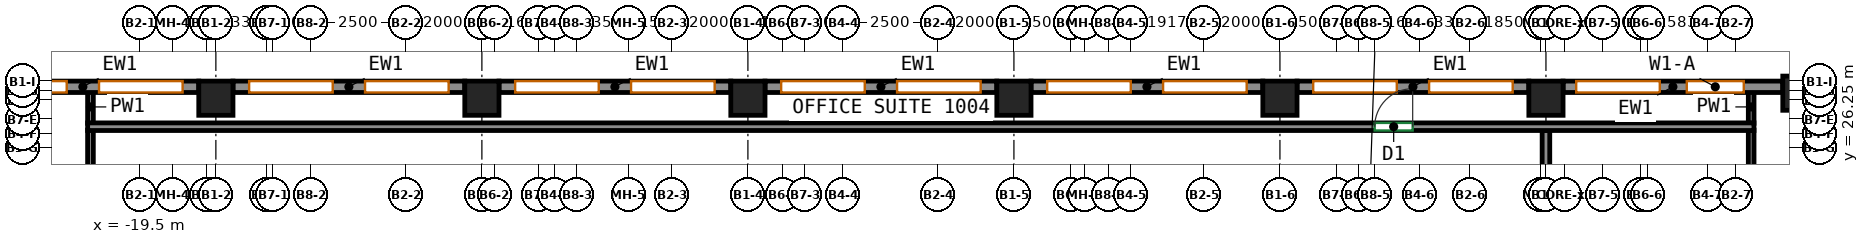
"""IFC4 building model, lengths in metres.
Left out: names, types, materials, properties, quantities, classifications, styles, units other than length and angle.
Written with IfcOpenShell. Run it as: python <this file> out.ifc"""

import sys

from ifc_helpers import new_model, si_unit, direction, frame, frame_2d, origin, origin_2d, place, context, subcontext, project, spatial, rectangle, extrude, source, transform, mapped, element, fill, save


model = new_model("IFC4")
c1 = context("Model", 3, precision=1e-05, world=origin(), true_north=direction((0.0, 1.0)))
c2 = subcontext(c1, "Body", "Model", "MODEL_VIEW")
j1 = project(units=[si_unit("LENGTHUNIT", "METRE"), si_unit("PLANEANGLEUNIT", "RADIAN")], contexts=[c1])
p1 = place(None, origin())
s1 = spatial("IfcSite", under=j1, at=p1, CompositionType="ELEMENT")
p2 = place(p1, origin())
s2 = spatial("IfcBuilding", under=s1, at=p2, CompositionType="ELEMENT")
p3 = place(p2, frame((0.0, 0.0, 47.0)))
s3 = spatial("IfcBuildingStorey", under=s2, at=p3, CompositionType="ELEMENT", Elevation=47.0)
m1 = source(origin(), c2, "Body", "SweptSolid", [
    extrude(rectangle(XDim=0.9, YDim=0.9, at=origin_2d()), origin(), (0.0, 0.0, 1.0), 3.72),
])
for number, where, z_axis, x_axis in (
    (1, (-17.5, 27.55, 0.0), (0.0, 0.0, 1.0), (1.0, 0.0, 0.0)),
    (2, (-10.5, 27.55, 0.0), (0.0, 0.0, 1.0), (1.0, 0.0, 0.0)),
    (3, (-3.5, 27.55, 0.0), (0.0, 0.0, 1.0), (1.0, 0.0, 0.0)),
    (4, (3.5, 27.55, 0.0), (0.0, 0.0, 1.0), (1.0, 0.0, 0.0)),
    (5, (10.5, 27.55, 0.0), (0.0, 0.0, 1.0), (1.0, 0.0, 0.0)),
    (6, (17.5, 27.55, 0.0), (0.0, 0.0, 1.0), (1.0, 0.0, 0.0)),
    (7, (24.182, 27.682, 0.0), (0.0, 0.0, 1.0), (1.0, 0.0, 0.0)),
):
    element("IfcColumn", number, at=place(p3, frame(where, z_axis=z_axis, x_axis=x_axis)), inside=s3, PredefinedType="COLUMN", context=c2, shape_type="MappedRepresentation", body=[
        mapped(m1, transform((0.0, 0.0, 0.0))),
    ])
m2 = source(origin(), c2, "Body", "SweptSolid", [
    extrude(rectangle(XDim=5.782, YDim=0.3, at=frame_2d((2.891, 0.0))), origin(), (0.0, 0.0, 1.0), 3.72),
])
p4 = place(p3, frame((23.732, 27.85, 0.0), z_axis=(0.0, 0.0, 1.0), x_axis=(-1.0, 0.0, 0.0)))
e8 = element("IfcWall", 8, at=p4, inside=s3, PredefinedType="SOLIDWALL", context=c2, shape_type="MappedRepresentation", body=[
    mapped(m2, transform((0.0, 0.0, 0.0))),
])
p5 = place(p4, frame((1.026, 0.0, 0.7)))
e9 = element("IfcOpeningElement", 9, at=p5, cuts=e8, PredefinedType="OPENING", context=c2, shape_type="SweptSolid", body=[
    extrude(rectangle(XDim=1.5, YDim=2.25, at=frame_2d((0.75, 1.125))), frame((0.0, 0.16, 0.0), z_axis=(0.0, -1.0, 0.0), x_axis=(1.0, 0.0, 0.0)), (0.0, 0.0, 1.0), 0.32),
])
p6 = place(p4, frame((3.236, 0.0, 0.7)))
e10 = element("IfcOpeningElement", 10, at=p6, cuts=e8, PredefinedType="OPENING", context=c2, shape_type="SweptSolid", body=[
    extrude(rectangle(XDim=2.2, YDim=2.25, at=frame_2d((1.1, 1.125))), frame((0.0, 0.16, 0.0), z_axis=(0.0, -1.0, 0.0), x_axis=(1.0, 0.0, 0.0)), (0.0, 0.0, 1.0), 0.32),
])
m3 = source(origin(), c2, "Body", "SweptSolid", [
    extrude(rectangle(XDim=6.1, YDim=0.3, at=frame_2d((3.05, 0.0))), origin(), (0.0, 0.0, 1.0), 3.72),
])
p7 = place(p3, frame((17.05, 27.85, 0.0), z_axis=(0.0, 0.0, 1.0), x_axis=(-1.0, 0.0, 0.0)))
e11 = element("IfcWall", 11, at=p7, inside=s3, PredefinedType="SOLIDWALL", context=c2, shape_type="MappedRepresentation", body=[
    mapped(m3, transform((0.0, 0.0, 0.0))),
])
p8 = place(p7, frame((0.425, 0.0, 0.7)))
e12 = element("IfcOpeningElement", 12, at=p8, cuts=e11, PredefinedType="OPENING", context=c2, shape_type="SweptSolid", body=[
    extrude(rectangle(XDim=2.2, YDim=2.25, at=frame_2d((1.1, 1.125))), frame((0.0, 0.16, 0.0), z_axis=(0.0, -1.0, 0.0), x_axis=(1.0, 0.0, 0.0)), (0.0, 0.0, 1.0), 0.32),
])
p9 = place(p7, frame((3.475, 0.0, 0.7)))
e13 = element("IfcOpeningElement", 13, at=p9, cuts=e11, PredefinedType="OPENING", context=c2, shape_type="SweptSolid", body=[
    extrude(rectangle(XDim=2.2, YDim=2.25, at=frame_2d((1.1, 1.125))), frame((0.0, 0.16, 0.0), z_axis=(0.0, -1.0, 0.0), x_axis=(1.0, 0.0, 0.0)), (0.0, 0.0, 1.0), 0.32),
])
p10 = place(p3, frame((10.05, 27.85, 0.0), z_axis=(0.0, 0.0, 1.0), x_axis=(-1.0, 0.0, 0.0)))
e14 = element("IfcWall", 14, at=p10, inside=s3, PredefinedType="SOLIDWALL", context=c2, shape_type="MappedRepresentation", body=[
    mapped(m3, transform((0.0, 0.0, 0.0))),
])
p11 = place(p10, frame((0.425, 0.0, 0.7)))
e15 = element("IfcOpeningElement", 15, at=p11, cuts=e14, PredefinedType="OPENING", context=c2, shape_type="SweptSolid", body=[
    extrude(rectangle(XDim=2.2, YDim=2.25, at=frame_2d((1.1, 1.125))), frame((0.0, 0.16, 0.0), z_axis=(0.0, -1.0, 0.0), x_axis=(1.0, 0.0, 0.0)), (0.0, 0.0, 1.0), 0.32),
])
p12 = place(p10, frame((3.475, 0.0, 0.7)))
e16 = element("IfcOpeningElement", 16, at=p12, cuts=e14, PredefinedType="OPENING", context=c2, shape_type="SweptSolid", body=[
    extrude(rectangle(XDim=2.2, YDim=2.25, at=frame_2d((1.1, 1.125))), frame((0.0, 0.16, 0.0), z_axis=(0.0, -1.0, 0.0), x_axis=(1.0, 0.0, 0.0)), (0.0, 0.0, 1.0), 0.32),
])
p13 = place(p3, frame((3.05, 27.85, 0.0), z_axis=(0.0, 0.0, 1.0), x_axis=(-1.0, 0.0, 0.0)))
e17 = element("IfcWall", 17, at=p13, inside=s3, PredefinedType="SOLIDWALL", context=c2, shape_type="MappedRepresentation", body=[
    mapped(m3, transform((0.0, 0.0, 0.0))),
])
p14 = place(p13, frame((0.425, 0.0, 0.7)))
e18 = element("IfcOpeningElement", 18, at=p14, cuts=e17, PredefinedType="OPENING", context=c2, shape_type="SweptSolid", body=[
    extrude(rectangle(XDim=2.2, YDim=2.25, at=frame_2d((1.1, 1.125))), frame((0.0, 0.16, 0.0), z_axis=(0.0, -1.0, 0.0), x_axis=(1.0, 0.0, 0.0)), (0.0, 0.0, 1.0), 0.32),
])
p15 = place(p13, frame((3.475, 0.0, 0.7)))
e19 = element("IfcOpeningElement", 19, at=p15, cuts=e17, PredefinedType="OPENING", context=c2, shape_type="SweptSolid", body=[
    extrude(rectangle(XDim=2.2, YDim=2.25, at=frame_2d((1.1, 1.125))), frame((0.0, 0.16, 0.0), z_axis=(0.0, -1.0, 0.0), x_axis=(1.0, 0.0, 0.0)), (0.0, 0.0, 1.0), 0.32),
])
p16 = place(p3, frame((-3.95, 27.85, 0.0), z_axis=(0.0, 0.0, 1.0), x_axis=(-1.0, 0.0, 0.0)))
e20 = element("IfcWall", 20, at=p16, inside=s3, PredefinedType="SOLIDWALL", context=c2, shape_type="MappedRepresentation", body=[
    mapped(m3, transform((0.0, 0.0, 0.0))),
])
p17 = place(p16, frame((0.425, 0.0, 0.7)))
e21 = element("IfcOpeningElement", 21, at=p17, cuts=e20, PredefinedType="OPENING", context=c2, shape_type="SweptSolid", body=[
    extrude(rectangle(XDim=2.2, YDim=2.25, at=frame_2d((1.1, 1.125))), frame((0.0, 0.16, 0.0), z_axis=(0.0, -1.0, 0.0), x_axis=(1.0, 0.0, 0.0)), (0.0, 0.0, 1.0), 0.32),
])
p18 = place(p16, frame((3.475, 0.0, 0.7)))
e22 = element("IfcOpeningElement", 22, at=p18, cuts=e20, PredefinedType="OPENING", context=c2, shape_type="SweptSolid", body=[
    extrude(rectangle(XDim=2.2, YDim=2.25, at=frame_2d((1.1, 1.125))), frame((0.0, 0.16, 0.0), z_axis=(0.0, -1.0, 0.0), x_axis=(1.0, 0.0, 0.0)), (0.0, 0.0, 1.0), 0.32),
])
p19 = place(p3, frame((-10.95, 27.85, 0.0), z_axis=(0.0, 0.0, 1.0), x_axis=(-1.0, 0.0, 0.0)))
e23 = element("IfcWall", 23, at=p19, inside=s3, PredefinedType="SOLIDWALL", context=c2, shape_type="MappedRepresentation", body=[
    mapped(m3, transform((0.0, 0.0, 0.0))),
])
p20 = place(p19, frame((0.425, 0.0, 0.7)))
e24 = element("IfcOpeningElement", 24, at=p20, cuts=e23, PredefinedType="OPENING", context=c2, shape_type="SweptSolid", body=[
    extrude(rectangle(XDim=2.2, YDim=2.25, at=frame_2d((1.1, 1.125))), frame((0.0, 0.16, 0.0), z_axis=(0.0, -1.0, 0.0), x_axis=(1.0, 0.0, 0.0)), (0.0, 0.0, 1.0), 0.32),
])
p21 = place(p19, frame((3.475, 0.0, 0.7)))
e25 = element("IfcOpeningElement", 25, at=p21, cuts=e23, PredefinedType="OPENING", context=c2, shape_type="SweptSolid", body=[
    extrude(rectangle(XDim=2.2, YDim=2.25, at=frame_2d((1.1, 1.125))), frame((0.0, 0.16, 0.0), z_axis=(0.0, -1.0, 0.0), x_axis=(1.0, 0.0, 0.0)), (0.0, 0.0, 1.0), 0.32),
])
p22 = place(p3, frame((-17.95, 27.85, 0.0), z_axis=(0.0, 0.0, 1.0), x_axis=(-1.0, 0.0, 0.0)))
e26 = element("IfcWall", 26, at=p22, inside=s3, PredefinedType="SOLIDWALL", context=c2, shape_type="MappedRepresentation", body=[
    mapped(m3, transform((0.0, 0.0, 0.0))),
])
p23 = place(p22, frame((0.425, 0.0, 0.7)))
e27 = element("IfcOpeningElement", 27, at=p23, cuts=e26, PredefinedType="OPENING", context=c2, shape_type="SweptSolid", body=[
    extrude(rectangle(XDim=2.2, YDim=2.25, at=frame_2d((1.1, 1.125))), frame((0.0, 0.16, 0.0), z_axis=(0.0, -1.0, 0.0), x_axis=(1.0, 0.0, 0.0)), (0.0, 0.0, 1.0), 0.32),
])
p24 = place(p22, frame((3.475, 0.0, 0.7)))
e28 = element("IfcOpeningElement", 28, at=p24, cuts=e26, PredefinedType="OPENING", context=c2, shape_type="SweptSolid", body=[
    extrude(rectangle(XDim=2.2, YDim=2.25, at=frame_2d((1.1, 1.125))), frame((0.0, 0.16, 0.0), z_axis=(0.0, -1.0, 0.0), x_axis=(1.0, 0.0, 0.0)), (0.0, 0.0, 1.0), 0.32),
])
p25 = place(p3, frame((-20.8, 3.275, 0.0), z_axis=(0.0, 0.0, 1.0), x_axis=(0.0, 1.0, 0.0)))
e29 = element("IfcWall", 29, at=p25, inside=s3, PredefinedType="PARTITIONING", context=c2, shape_type="SweptSolid", body=[
    extrude(rectangle(XDim=23.435, YDim=0.15, at=frame_2d((11.718, 0.0))), origin(), (0.0, 0.0, 1.0), 3.72),
])
p26 = place(p25, frame((10.216, 0.0, 0.0)))
e30 = element("IfcOpeningElement", 30, at=p26, cuts=e29, PredefinedType="OPENING", context=c2, shape_type="SweptSolid", body=[
    extrude(rectangle(XDim=0.9, YDim=2.1, at=frame_2d((0.45, 1.05))), frame((0.0, 0.085, 0.0), z_axis=(0.0, -1.0, 0.0), x_axis=(1.0, 0.0, 0.0)), (0.0, 0.0, 1.0), 0.17),
])
p27 = place(p3, frame((22.9, 3.275, 0.0), z_axis=(0.0, 0.0, 1.0), x_axis=(0.0, 1.0, 0.0)))
e31 = element("IfcWall", 31, at=p27, inside=s3, PredefinedType="PARTITIONING", context=c2, shape_type="SweptSolid", body=[
    extrude(rectangle(XDim=23.435, YDim=0.15, at=frame_2d((11.718, 0.0))), origin(), (0.0, 0.0, 1.0), 3.72),
])
p28 = place(p27, frame((9.715, 0.0, 0.0)))
e32 = element("IfcOpeningElement", 32, at=p28, cuts=e31, PredefinedType="OPENING", context=c2, shape_type="SweptSolid", body=[
    extrude(rectangle(XDim=0.9, YDim=2.1, at=frame_2d((0.45, 1.05))), frame((0.0, 0.085, 0.0), z_axis=(0.0, -1.0, 0.0), x_axis=(1.0, 0.0, 0.0)), (0.0, 0.0, 1.0), 0.17),
])
for number, where, z_axis, x_axis in (
    (33, (-20.8, 26.891, 0.0), (0.0, 0.0, 1.0), (0.0, 1.0, 0.0)),
    (34, (22.9, 26.891, 0.0), (0.0, 0.0, 1.0), (0.0, 1.0, 0.0)),
):
    element("IfcWall", number, at=place(p3, frame(where, z_axis=z_axis, x_axis=x_axis)), inside=s3, PredefinedType="PARTITIONING", context=c2, shape_type="SweptSolid", body=[
        extrude(rectangle(XDim=0.859, YDim=0.15, at=frame_2d((0.429, 0.0))), origin(), (0.0, 0.0, 1.0), 3.72),
    ])
p29 = place(p3, frame((17.5, 22.0, 0.0), z_axis=(0.0, 0.0, 1.0), x_axis=(0.0, 1.0, 0.0)))
e35 = element("IfcWall", 35, at=p29, inside=s3, PredefinedType="PARTITIONING", context=c2, shape_type="SweptSolid", body=[
    extrude(rectangle(XDim=4.7, YDim=0.2, at=frame_2d((2.35, 0.0))), origin(), (0.0, 0.0, 1.0), 3.72),
])
p30 = place(p3, frame((-20.874, 26.8, 0.0), z_axis=(0.0, 0.0, 1.0), x_axis=(1.0, 0.0, 0.0)))
e36 = element("IfcWall", 36, at=p30, inside=s3, PredefinedType="PARTITIONING", context=c2, shape_type="SweptSolid", body=[
    extrude(rectangle(XDim=43.848, YDim=0.2, at=frame_2d((21.924, 0.0))), origin(), (0.0, 0.0, 1.0), 3.72),
])
p31 = place(p30, frame((33.867, 0.0, 0.0)))
e37 = element("IfcOpeningElement", 37, at=p31, cuts=e36, PredefinedType="OPENING", context=c2, shape_type="SweptSolid", body=[
    extrude(rectangle(XDim=1.0, YDim=2.1, at=frame_2d((0.5, 1.05))), frame((0.0, 0.11, 0.0), z_axis=(0.0, -1.0, 0.0), x_axis=(1.0, 0.0, 0.0)), (0.0, 0.0, 1.0), 0.22),
])
p32 = place(p5, origin())
e38 = element("IfcWindow", 38, at=p32, inside=s3, PartitioningType="SINGLE_PANEL", PredefinedType="WINDOW", context=c2, shape_type="SweptSolid", body=[
    extrude(rectangle(XDim=1.5, YDim=2.25, at=frame_2d((0.75, 1.125))), frame((0.0, 0.03, 0.0), z_axis=(0.0, -1.0, 0.0), x_axis=(1.0, 0.0, 0.0)), (0.0, 0.0, 1.0), 0.06),
])
fill(e9, e38)
p33 = place(p6, origin())
e39 = element("IfcWindow", 39, at=p33, inside=s3, PartitioningType="SINGLE_PANEL", PredefinedType="WINDOW", context=c2, shape_type="SweptSolid", body=[
    extrude(rectangle(XDim=2.2, YDim=2.25, at=frame_2d((1.1, 1.125))), frame((0.0, 0.03, 0.0), z_axis=(0.0, -1.0, 0.0), x_axis=(1.0, 0.0, 0.0)), (0.0, 0.0, 1.0), 0.06),
])
fill(e10, e39)
p34 = place(p8, origin())
e40 = element("IfcWindow", 40, at=p34, inside=s3, PartitioningType="SINGLE_PANEL", PredefinedType="WINDOW", context=c2, shape_type="SweptSolid", body=[
    extrude(rectangle(XDim=2.2, YDim=2.25, at=frame_2d((1.1, 1.125))), frame((0.0, 0.03, 0.0), z_axis=(0.0, -1.0, 0.0), x_axis=(1.0, 0.0, 0.0)), (0.0, 0.0, 1.0), 0.06),
])
fill(e12, e40)
p35 = place(p9, origin())
e41 = element("IfcWindow", 41, at=p35, inside=s3, PartitioningType="SINGLE_PANEL", PredefinedType="WINDOW", context=c2, shape_type="SweptSolid", body=[
    extrude(rectangle(XDim=2.2, YDim=2.25, at=frame_2d((1.1, 1.125))), frame((0.0, 0.03, 0.0), z_axis=(0.0, -1.0, 0.0), x_axis=(1.0, 0.0, 0.0)), (0.0, 0.0, 1.0), 0.06),
])
fill(e13, e41)
p36 = place(p11, origin())
e42 = element("IfcWindow", 42, at=p36, inside=s3, PartitioningType="SINGLE_PANEL", PredefinedType="WINDOW", context=c2, shape_type="SweptSolid", body=[
    extrude(rectangle(XDim=2.2, YDim=2.25, at=frame_2d((1.1, 1.125))), frame((0.0, 0.03, 0.0), z_axis=(0.0, -1.0, 0.0), x_axis=(1.0, 0.0, 0.0)), (0.0, 0.0, 1.0), 0.06),
])
fill(e15, e42)
p37 = place(p12, origin())
e43 = element("IfcWindow", 43, at=p37, inside=s3, PartitioningType="SINGLE_PANEL", PredefinedType="WINDOW", context=c2, shape_type="SweptSolid", body=[
    extrude(rectangle(XDim=2.2, YDim=2.25, at=frame_2d((1.1, 1.125))), frame((0.0, 0.03, 0.0), z_axis=(0.0, -1.0, 0.0), x_axis=(1.0, 0.0, 0.0)), (0.0, 0.0, 1.0), 0.06),
])
fill(e16, e43)
p38 = place(p14, origin())
e44 = element("IfcWindow", 44, at=p38, inside=s3, PartitioningType="SINGLE_PANEL", PredefinedType="WINDOW", context=c2, shape_type="SweptSolid", body=[
    extrude(rectangle(XDim=2.2, YDim=2.25, at=frame_2d((1.1, 1.125))), frame((0.0, 0.03, 0.0), z_axis=(0.0, -1.0, 0.0), x_axis=(1.0, 0.0, 0.0)), (0.0, 0.0, 1.0), 0.06),
])
fill(e18, e44)
p39 = place(p15, origin())
e45 = element("IfcWindow", 45, at=p39, inside=s3, PartitioningType="SINGLE_PANEL", PredefinedType="WINDOW", context=c2, shape_type="SweptSolid", body=[
    extrude(rectangle(XDim=2.2, YDim=2.25, at=frame_2d((1.1, 1.125))), frame((0.0, 0.03, 0.0), z_axis=(0.0, -1.0, 0.0), x_axis=(1.0, 0.0, 0.0)), (0.0, 0.0, 1.0), 0.06),
])
fill(e19, e45)
p40 = place(p17, origin())
e46 = element("IfcWindow", 46, at=p40, inside=s3, PartitioningType="SINGLE_PANEL", PredefinedType="WINDOW", context=c2, shape_type="SweptSolid", body=[
    extrude(rectangle(XDim=2.2, YDim=2.25, at=frame_2d((1.1, 1.125))), frame((0.0, 0.03, 0.0), z_axis=(0.0, -1.0, 0.0), x_axis=(1.0, 0.0, 0.0)), (0.0, 0.0, 1.0), 0.06),
])
fill(e21, e46)
p41 = place(p18, origin())
e47 = element("IfcWindow", 47, at=p41, inside=s3, PartitioningType="SINGLE_PANEL", PredefinedType="WINDOW", context=c2, shape_type="SweptSolid", body=[
    extrude(rectangle(XDim=2.2, YDim=2.25, at=frame_2d((1.1, 1.125))), frame((0.0, 0.03, 0.0), z_axis=(0.0, -1.0, 0.0), x_axis=(1.0, 0.0, 0.0)), (0.0, 0.0, 1.0), 0.06),
])
fill(e22, e47)
p42 = place(p20, origin())
e48 = element("IfcWindow", 48, at=p42, inside=s3, PartitioningType="SINGLE_PANEL", PredefinedType="WINDOW", context=c2, shape_type="SweptSolid", body=[
    extrude(rectangle(XDim=2.2, YDim=2.25, at=frame_2d((1.1, 1.125))), frame((0.0, 0.03, 0.0), z_axis=(0.0, -1.0, 0.0), x_axis=(1.0, 0.0, 0.0)), (0.0, 0.0, 1.0), 0.06),
])
fill(e24, e48)
p43 = place(p21, origin())
e49 = element("IfcWindow", 49, at=p43, inside=s3, PartitioningType="SINGLE_PANEL", PredefinedType="WINDOW", context=c2, shape_type="SweptSolid", body=[
    extrude(rectangle(XDim=2.2, YDim=2.25, at=frame_2d((1.1, 1.125))), frame((0.0, 0.03, 0.0), z_axis=(0.0, -1.0, 0.0), x_axis=(1.0, 0.0, 0.0)), (0.0, 0.0, 1.0), 0.06),
])
fill(e25, e49)
p44 = place(p23, origin())
e50 = element("IfcWindow", 50, at=p44, inside=s3, PartitioningType="SINGLE_PANEL", PredefinedType="WINDOW", context=c2, shape_type="SweptSolid", body=[
    extrude(rectangle(XDim=2.2, YDim=2.25, at=frame_2d((1.1, 1.125))), frame((0.0, 0.03, 0.0), z_axis=(0.0, -1.0, 0.0), x_axis=(1.0, 0.0, 0.0)), (0.0, 0.0, 1.0), 0.06),
])
fill(e27, e50)
p45 = place(p24, origin())
e51 = element("IfcWindow", 51, at=p45, inside=s3, PartitioningType="SINGLE_PANEL", PredefinedType="WINDOW", context=c2, shape_type="SweptSolid", body=[
    extrude(rectangle(XDim=2.2, YDim=2.25, at=frame_2d((1.1, 1.125))), frame((0.0, 0.03, 0.0), z_axis=(0.0, -1.0, 0.0), x_axis=(1.0, 0.0, 0.0)), (0.0, 0.0, 1.0), 0.06),
])
fill(e28, e51)
p46 = place(p31, origin())
e52 = element("IfcDoor", 52, at=p46, inside=s3, OperationType="SINGLE_SWING_RIGHT", PredefinedType="DOOR", context=c2, shape_type="SweptSolid", body=[
    extrude(rectangle(XDim=1.0, YDim=2.1, at=frame_2d((0.5, 1.05))), frame((0.0, 0.025, 0.0), z_axis=(0.0, -1.0, 0.0), x_axis=(1.0, 0.0, 0.0)), (0.0, 0.0, 1.0), 0.05),
])
fill(e37, e52)
save(model, sys.argv[1])
